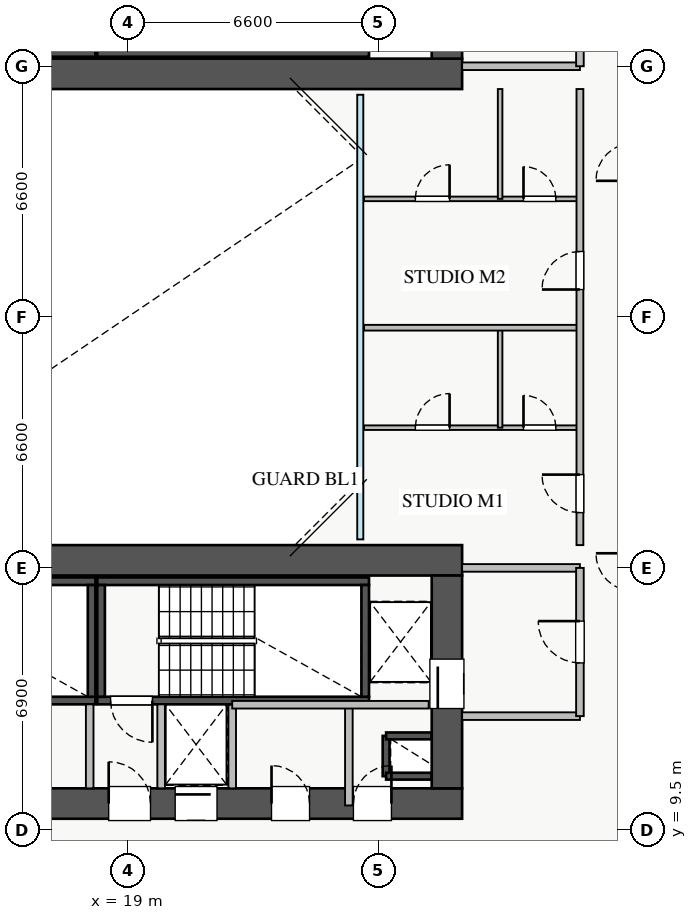
"""IFC4 building model, lengths in metres.
Left out: names, types, materials, properties, quantities, classifications, styles, units other than length and angle.
Written with IfcOpenShell. Run it as: python <this file> out.ifc"""

import sys

from ifc_helpers import new_model, si_unit, direction, frame, frame_2d, origin, place, context, subcontext, project, spatial, rectangle, extrude, source, transform, mapped, element, fill, save


model = new_model("IFC4")
c1 = context("Model", 3, precision=1e-05, world=origin(), true_north=direction((0.0, 1.0)))
c2 = subcontext(c1, "Body", "Model", "MODEL_VIEW")
j1 = project(units=[si_unit("LENGTHUNIT", "METRE"), si_unit("PLANEANGLEUNIT", "RADIAN")], contexts=[c1])
p1 = place(None, origin())
s1 = spatial("IfcSite", under=j1, at=p1, CompositionType="ELEMENT")
p2 = place(p1, origin())
s2 = spatial("IfcBuilding", under=s1, at=p2, CompositionType="ELEMENT")
p3 = place(p2, frame((0.0, 0.0, 29.5)))
s3 = spatial("IfcBuildingStorey", under=s2, at=p3, CompositionType="ELEMENT", Elevation=29.5)
p4 = place(p3, frame((25.8, 10.92, 0.0), z_axis=(0.0, 0.0, 1.0), x_axis=(0.0, 1.0, 0.0)))
e1 = element("IfcWall", 1, at=p4, inside=s3, PredefinedType="SHEAR", context=c2, shape_type="SweptSolid", body=[
    extrude(rectangle(XDim=1.06, YDim=0.18, at=frame_2d((0.53, 0.0))), origin(), (0.0, 0.0, 1.0), 3.07),
])
for number, where, z_axis, x_axis in (
    (2, (25.8, 11.98, 0.0), (0.0, 0.0, 1.0), (1.0, 0.0, 0.0)),
    (3, (25.8, 10.92, 0.0), (0.0, 0.0, 1.0), (1.0, 0.0, 0.0)),
):
    element("IfcWall", number, at=place(p3, frame(where, z_axis=z_axis, x_axis=x_axis)), inside=s3, PredefinedType="SHEAR", context=c2, shape_type="SweptSolid", body=[
        extrude(rectangle(XDim=1.2, YDim=0.18, at=frame_2d((0.6, 0.0))), origin(), (0.0, 0.0, 1.0), 3.07),
    ])
p5 = place(p3, frame((19.88, 12.8, 0.0), z_axis=(0.0, 0.0, 1.0), x_axis=(1.0, 0.0, 0.0)))
e4 = element("IfcWall", 4, at=p5, inside=s3, PredefinedType="SHEAR", context=c2, shape_type="SweptSolid", body=[
    extrude(rectangle(XDim=1.87, YDim=0.18, at=frame_2d((0.935, 0.0))), origin(), (0.0, 0.0, 1.0), 3.07),
])
p6 = place(p3, frame((11.0, 29.95, 0.0), z_axis=(0.0, 0.0, 1.0), x_axis=(1.0, 0.0, 0.0)))
e5 = element("IfcWall", 5, at=p6, inside=s3, PredefinedType="SHEAR", context=c2, shape_type="SweptSolid", body=[
    extrude(rectangle(XDim=7.15, YDim=0.2, at=frame_2d((3.575, 0.0))), origin(), (0.0, 0.0, 1.0), 3.25),
])
p7 = place(p3, frame((18.2, 29.95, 0.0), z_axis=(0.0, 0.0, 1.0), x_axis=(1.0, 0.0, 0.0)))
e6 = element("IfcWall", 6, at=p7, inside=s3, PredefinedType="SHEAR", context=c2, shape_type="SweptSolid", body=[
    extrude(rectangle(XDim=7.15, YDim=0.2, at=frame_2d((3.575, 0.0))), origin(), (0.0, 0.0, 1.0), 3.25),
])
p8 = place(p3, frame((11.0, 12.91, 0.0), z_axis=(0.0, 0.0, 1.0), x_axis=(1.0, 0.0, 0.0)))
e7 = element("IfcWall", 7, at=p8, inside=s3, PredefinedType="SHEAR", context=c2, shape_type="SweptSolid", body=[
    extrude(rectangle(XDim=7.15, YDim=0.2, at=frame_2d((3.575, 0.0))), origin(), (0.0, 0.0, 1.0), 3.25),
])
p9 = place(p8, frame((0.35, 0.0, 0.0)))
e8 = element("IfcOpeningElement", 8, at=p9, cuts=e7, PredefinedType="OPENING", context=c2, shape_type="SweptSolid", body=[
    extrude(rectangle(XDim=1.1, YDim=2.05, at=frame_2d((0.55, 1.025))), frame((0.0, 0.11, 0.0), z_axis=(0.0, -1.0, 0.0), x_axis=(1.0, 0.0, 0.0)), (0.0, 0.0, 1.0), 0.22),
])
p10 = place(p3, frame((11.0, 16.05, 0.0), z_axis=(0.0, 0.0, 1.0), x_axis=(1.0, 0.0, 0.0)))
e9 = element("IfcWall", 9, at=p10, inside=s3, PredefinedType="SHEAR", context=c2, shape_type="SweptSolid", body=[
    extrude(rectangle(XDim=7.15, YDim=0.2, at=frame_2d((3.575, 0.0))), origin(), (0.0, 0.0, 1.0), 3.25),
])
p11 = place(p3, frame((18.05, 13.01, 0.0), z_axis=(0.0, 0.0, 1.0), x_axis=(0.0, 1.0, 0.0)))
e10 = element("IfcWall", 10, at=p11, inside=s3, PredefinedType="SHEAR", context=c2, shape_type="SweptSolid", body=[
    extrude(rectangle(XDim=2.94, YDim=0.2, at=frame_2d((1.47, 0.0))), origin(), (0.0, 0.0, 1.0), 3.25),
])
p12 = place(p3, frame((18.2, 12.91, 0.0), z_axis=(0.0, 0.0, 1.0), x_axis=(1.0, 0.0, 0.0)))
e11 = element("IfcWall", 11, at=p12, inside=s3, PredefinedType="SHEAR", context=c2, shape_type="SweptSolid", body=[
    extrude(rectangle(XDim=7.15, YDim=0.2, at=frame_2d((3.575, 0.0))), origin(), (0.0, 0.0, 1.0), 3.25),
])
p13 = place(p12, frame((0.35, 0.0, 0.0)))
e12 = element("IfcOpeningElement", 12, at=p13, cuts=e11, PredefinedType="OPENING", context=c2, shape_type="SweptSolid", body=[
    extrude(rectangle(XDim=1.1, YDim=2.05, at=frame_2d((0.55, 1.025))), frame((0.0, 0.11, 0.0), z_axis=(0.0, -1.0, 0.0), x_axis=(1.0, 0.0, 0.0)), (0.0, 0.0, 1.0), 0.22),
])
p14 = place(p3, frame((18.2, 16.05, 0.0), z_axis=(0.0, 0.0, 1.0), x_axis=(1.0, 0.0, 0.0)))
e13 = element("IfcWall", 13, at=p14, inside=s3, PredefinedType="SHEAR", context=c2, shape_type="SweptSolid", body=[
    extrude(rectangle(XDim=7.15, YDim=0.2, at=frame_2d((3.575, 0.0))), origin(), (0.0, 0.0, 1.0), 3.25),
])
for number, where, z_axis, x_axis in (
    (14, (18.3, 13.01, 0.0), (0.0, 0.0, 1.0), (0.0, 1.0, 0.0)),
    (15, (25.25, 13.01, 0.0), (0.0, 0.0, 1.0), (0.0, 1.0, 0.0)),
):
    element("IfcWall", number, at=place(p3, frame(where, z_axis=z_axis, x_axis=x_axis)), inside=s3, PredefinedType="SHEAR", context=c2, shape_type="SweptSolid", body=[
        extrude(rectangle(XDim=2.94, YDim=0.2, at=frame_2d((1.47, 0.0))), origin(), (0.0, 0.0, 1.0), 3.25),
    ])
p15 = place(p3, frame((10.2, 29.4, 0.0), z_axis=(0.0, 0.0, 1.0), x_axis=(1.0, 0.0, 0.0)))
e16 = element("IfcWall", 16, at=p15, inside=s3, PredefinedType="SHEAR", context=c2, shape_type="SweptSolid", body=[
    extrude(rectangle(XDim=17.6, YDim=0.8, at=frame_2d((8.8, 0.0))), origin(), (0.0, 0.0, 1.0), 3.25),
])
p16 = place(p3, frame((27.4, 29.8, 0.0), z_axis=(0.0, 0.0, 1.0), x_axis=(0.0, 1.0, 0.0)))
e17 = element("IfcWall", 17, at=p16, inside=s3, PredefinedType="SHEAR", context=c2, shape_type="SweptSolid", body=[
    extrude(rectangle(XDim=5.6, YDim=0.8, at=frame_2d((2.8, 0.0))), origin(), (0.0, 0.0, 1.0), 3.25),
])
p17 = place(p16, frame((1.1, 0.0, 0.0)))
e18 = element("IfcOpeningElement", 18, at=p17, cuts=e17, PredefinedType="OPENING", context=c2, shape_type="SweptSolid", body=[
    extrude(rectangle(XDim=1.3, YDim=2.05, at=frame_2d((0.65, 1.025))), frame((0.0, 0.41, 0.0), z_axis=(0.0, -1.0, 0.0), x_axis=(1.0, 0.0, 0.0)), (0.0, 0.0, 1.0), 0.82),
])
p18 = place(p3, frame((10.2, 10.2, 0.0), z_axis=(0.0, 0.0, 1.0), x_axis=(1.0, 0.0, 0.0)))
e19 = element("IfcWall", 19, at=p18, inside=s3, PredefinedType="SHEAR", context=c2, shape_type="SweptSolid", body=[
    extrude(rectangle(XDim=17.6, YDim=0.8, at=frame_2d((8.8, 0.0))), origin(), (0.0, 0.0, 1.0), 3.25),
])
p19 = place(p18, frame((1.15, 0.0, 0.0)))
e20 = element("IfcOpeningElement", 20, at=p19, cuts=e19, PredefinedType="OPENING", context=c2, shape_type="SweptSolid", body=[
    extrude(rectangle(XDim=1.1, YDim=2.05, at=frame_2d((0.55, 1.025))), frame((0.0, 0.41, 0.0), z_axis=(0.0, -1.0, 0.0), x_axis=(1.0, 0.0, 0.0)), (0.0, 0.0, 1.0), 0.82),
])
p20 = place(p18, frame((8.3, 0.0, 0.0)))
e21 = element("IfcOpeningElement", 21, at=p20, cuts=e19, PredefinedType="OPENING", context=c2, shape_type="SweptSolid", body=[
    extrude(rectangle(XDim=1.1, YDim=2.05, at=frame_2d((0.55, 1.025))), frame((0.0, 0.41, 0.0), z_axis=(0.0, -1.0, 0.0), x_axis=(1.0, 0.0, 0.0)), (0.0, 0.0, 1.0), 0.82),
])
p21 = place(p18, frame((10.05, 0.0, 0.0)))
e22 = element("IfcOpeningElement", 22, at=p21, cuts=e19, PredefinedType="OPENING", context=c2, shape_type="SweptSolid", body=[
    extrude(rectangle(XDim=1.1, YDim=2.05, at=frame_2d((0.55, 1.025))), frame((0.0, 0.41, 0.0), z_axis=(0.0, -1.0, 0.0), x_axis=(1.0, 0.0, 0.0)), (0.0, 0.0, 1.0), 0.82),
])
p22 = place(p18, frame((14.74, 0.0, 0.0)))
e23 = element("IfcOpeningElement", 23, at=p22, cuts=e19, PredefinedType="OPENING", context=c2, shape_type="SweptSolid", body=[
    extrude(rectangle(XDim=1.0, YDim=2.05, at=frame_2d((0.5, 1.025))), frame((0.0, 0.41, 0.0), z_axis=(0.0, -1.0, 0.0), x_axis=(1.0, 0.0, 0.0)), (0.0, 0.0, 1.0), 0.82),
])
p23 = place(p18, frame((12.585, 0.0, 0.0)))
e24 = element("IfcOpeningElement", 24, at=p23, cuts=e19, PredefinedType="OPENING", context=c2, shape_type="SweptSolid", body=[
    extrude(rectangle(XDim=1.0, YDim=2.05, at=frame_2d((0.5, 1.025))), frame((0.0, 0.41, 0.0), z_axis=(0.0, -1.0, 0.0), x_axis=(1.0, 0.0, 0.0)), (0.0, 0.0, 1.0), 0.82),
])
p24 = place(p3, frame((10.2, 16.6, 0.0), z_axis=(0.0, 0.0, 1.0), x_axis=(1.0, 0.0, 0.0)))
e25 = element("IfcWall", 25, at=p24, inside=s3, PredefinedType="SHEAR", context=c2, shape_type="SweptSolid", body=[
    extrude(rectangle(XDim=17.6, YDim=0.8, at=frame_2d((8.8, 0.0))), origin(), (0.0, 0.0, 1.0), 3.25),
])
p25 = place(p3, frame((27.4, 10.6, 0.0), z_axis=(0.0, 0.0, 1.0), x_axis=(0.0, 1.0, 0.0)))
e26 = element("IfcWall", 26, at=p25, inside=s3, PredefinedType="SHEAR", context=c2, shape_type="SweptSolid", body=[
    extrude(rectangle(XDim=5.6, YDim=0.8, at=frame_2d((2.8, 0.0))), origin(), (0.0, 0.0, 1.0), 3.25),
])
p26 = place(p25, frame((2.1, 0.0, 0.0)))
e27 = element("IfcOpeningElement", 27, at=p26, cuts=e26, PredefinedType="OPENING", context=c2, shape_type="SweptSolid", body=[
    extrude(rectangle(XDim=1.3, YDim=2.05, at=frame_2d((0.65, 1.025))), frame((0.0, 0.41, 0.0), z_axis=(0.0, -1.0, 0.0), x_axis=(1.0, 0.0, 0.0)), (0.0, 0.0, 1.0), 0.82),
])
p27 = place(p3, frame((27.8, 29.6, 0.0), z_axis=(0.0, 0.0, 1.0), x_axis=(1.0, 0.0, 0.0)))
e28 = element("IfcWall", 28, at=p27, inside=s3, PredefinedType="PARTITIONING", context=c2, shape_type="SweptSolid", body=[
    extrude(rectangle(XDim=3.1, YDim=0.2, at=frame_2d((1.55, 0.0))), origin(), (0.0, 0.0, 1.0), 3.07),
])
p28 = place(p3, frame((30.9, 29.6, 0.0), z_axis=(0.0, 0.0, 1.0), x_axis=(0.0, 1.0, 0.0)))
e29 = element("IfcWall", 29, at=p28, inside=s3, PredefinedType="PARTITIONING", context=c2, shape_type="SweptSolid", body=[
    extrude(rectangle(XDim=3.9, YDim=0.2, at=frame_2d((1.95, 0.0))), origin(), (0.0, 0.0, 1.0), 3.07),
])
p29 = place(p28, frame((1.4, 0.0, 0.0)))
e30 = element("IfcOpeningElement", 30, at=p29, cuts=e29, PredefinedType="OPENING", context=c2, shape_type="SweptSolid", body=[
    extrude(rectangle(XDim=1.1, YDim=2.05, at=frame_2d((0.55, 1.025))), frame((0.0, 0.11, 0.0), z_axis=(0.0, -1.0, 0.0), x_axis=(1.0, 0.0, 0.0)), (0.0, 0.0, 1.0), 0.22),
])
for number, where, z_axis, x_axis in (
    (31, (27.8, 16.4, 0.0), (0.0, 0.0, 1.0), (1.0, 0.0, 0.0)),
    (32, (27.8, 12.5, 0.0), (0.0, 0.0, 1.0), (1.0, 0.0, 0.0)),
):
    element("IfcWall", number, at=place(p3, frame(where, z_axis=z_axis, x_axis=x_axis)), inside=s3, PredefinedType="PARTITIONING", context=c2, shape_type="SweptSolid", body=[
        extrude(rectangle(XDim=3.1, YDim=0.2, at=frame_2d((1.55, 0.0))), origin(), (0.0, 0.0, 1.0), 3.07),
    ])
p30 = place(p3, frame((30.9, 12.5, 0.0), z_axis=(0.0, 0.0, 1.0), x_axis=(0.0, 1.0, 0.0)))
e33 = element("IfcWall", 33, at=p30, inside=s3, PredefinedType="PARTITIONING", context=c2, shape_type="SweptSolid", body=[
    extrude(rectangle(XDim=3.9, YDim=0.2, at=frame_2d((1.95, 0.0))), origin(), (0.0, 0.0, 1.0), 3.07),
])
p31 = place(p30, frame((1.4, 0.0, 0.0)))
e34 = element("IfcOpeningElement", 34, at=p31, cuts=e33, PredefinedType="OPENING", context=c2, shape_type="SweptSolid", body=[
    extrude(rectangle(XDim=1.1, YDim=2.05, at=frame_2d((0.55, 1.025))), frame((0.0, 0.11, 0.0), z_axis=(0.0, -1.0, 0.0), x_axis=(1.0, 0.0, 0.0)), (0.0, 0.0, 1.0), 0.22),
])
for number, where, z_axis, x_axis in (
    (35, (18.0, 10.6, 0.0), (0.0, 0.0, 1.0), (0.0, 1.0, 0.0)),
    (36, (19.88, 10.6, 0.0), (0.0, 0.0, 1.0), (0.0, 1.0, 0.0)),
):
    element("IfcWall", number, at=place(p3, frame(where, z_axis=z_axis, x_axis=x_axis)), inside=s3, PredefinedType="PARTITIONING", context=c2, shape_type="SweptSolid", body=[
        extrude(rectangle(XDim=2.21, YDim=0.2, at=frame_2d((1.105, 0.0))), origin(), (0.0, 0.0, 1.0), 3.07),
    ])
p32 = place(p3, frame((24.82, 10.15, 0.0), z_axis=(0.0, 0.0, 1.0), x_axis=(0.0, 1.0, 0.0)))
e37 = element("IfcWall", 37, at=p32, inside=s3, PredefinedType="PARTITIONING", context=c2, shape_type="SweptSolid", body=[
    extrude(rectangle(XDim=2.65, YDim=0.2, at=frame_2d((1.325, 0.0))), origin(), (0.0, 0.0, 1.0), 3.07),
])
p33 = place(p3, frame((21.75, 10.6, 0.0), z_axis=(0.0, 0.0, 1.0), x_axis=(0.0, 1.0, 0.0)))
e38 = element("IfcWall", 38, at=p33, inside=s3, PredefinedType="PARTITIONING", context=c2, shape_type="SweptSolid", body=[
    extrude(rectangle(XDim=2.2, YDim=0.2, at=frame_2d((1.1, 0.0))), origin(), (0.0, 0.0, 1.0), 3.07),
])
p34 = place(p3, frame((21.75, 12.8, 0.0), z_axis=(0.0, 0.0, 1.0), x_axis=(1.0, 0.0, 0.0)))
e39 = element("IfcWall", 39, at=p34, inside=s3, PredefinedType="PARTITIONING", context=c2, shape_type="SweptSolid", body=[
    extrude(rectangle(XDim=5.17, YDim=0.2, at=frame_2d((2.585, 0.0))), origin(), (0.0, 0.0, 1.0), 3.07),
])
p35 = place(p3, frame((25.22, 20.09, 0.0), z_axis=(0.0, 0.0, 1.0), x_axis=(1.0, 0.0, 0.0)))
e40 = element("IfcWall", 40, at=p35, inside=s3, PredefinedType="PLUMBINGWALL", context=c2, shape_type="SweptSolid", body=[
    extrude(rectangle(XDim=5.68, YDim=0.12, at=frame_2d((2.84, 0.0))), origin(), (0.0, 0.0, 1.0), 2.625),
])
p36 = place(p35, frame((1.35, 0.0, 0.0)))
e41 = element("IfcOpeningElement", 41, at=p36, cuts=e40, PredefinedType="OPENING", context=c2, shape_type="SweptSolid", body=[
    extrude(rectangle(XDim=0.9, YDim=2.05, at=frame_2d((0.45, 1.025))), frame((0.0, 0.07, 0.0), z_axis=(0.0, -1.0, 0.0), x_axis=(1.0, 0.0, 0.0)), (0.0, 0.0, 1.0), 0.14),
])
p37 = place(p35, frame((4.195, 0.0, 0.0)))
e42 = element("IfcOpeningElement", 42, at=p37, cuts=e40, PredefinedType="OPENING", context=c2, shape_type="SweptSolid", body=[
    extrude(rectangle(XDim=0.85, YDim=2.05, at=frame_2d((0.425, 1.025))), frame((0.0, 0.07, 0.0), z_axis=(0.0, -1.0, 0.0), x_axis=(1.0, 0.0, 0.0)), (0.0, 0.0, 1.0), 0.14),
])
p38 = place(p3, frame((28.8, 20.09, 0.0), z_axis=(0.0, 0.0, 1.0), x_axis=(0.0, 1.0, 0.0)))
e43 = element("IfcWall", 43, at=p38, inside=s3, PredefinedType="PLUMBINGWALL", context=c2, shape_type="SweptSolid", body=[
    extrude(rectangle(XDim=2.63, YDim=0.12, at=frame_2d((1.315, 0.0))), origin(), (0.0, 0.0, 1.0), 3.07),
])
p39 = place(p3, frame((25.22, 26.11, 0.0), z_axis=(0.0, 0.0, 1.0), x_axis=(1.0, 0.0, 0.0)))
e44 = element("IfcWall", 44, at=p39, inside=s3, PredefinedType="PLUMBINGWALL", context=c2, shape_type="SweptSolid", body=[
    extrude(rectangle(XDim=5.68, YDim=0.12, at=frame_2d((2.84, 0.0))), origin(), (0.0, 0.0, 1.0), 2.625),
])
p40 = place(p39, frame((1.35, 0.0, 0.0)))
e45 = element("IfcOpeningElement", 45, at=p40, cuts=e44, PredefinedType="OPENING", context=c2, shape_type="SweptSolid", body=[
    extrude(rectangle(XDim=0.9, YDim=2.05, at=frame_2d((0.45, 1.025))), frame((0.0, 0.07, 0.0), z_axis=(0.0, -1.0, 0.0), x_axis=(1.0, 0.0, 0.0)), (0.0, 0.0, 1.0), 0.14),
])
p41 = place(p39, frame((4.195, 0.0, 0.0)))
e46 = element("IfcOpeningElement", 46, at=p41, cuts=e44, PredefinedType="OPENING", context=c2, shape_type="SweptSolid", body=[
    extrude(rectangle(XDim=0.85, YDim=2.05, at=frame_2d((0.425, 1.025))), frame((0.0, 0.07, 0.0), z_axis=(0.0, -1.0, 0.0), x_axis=(1.0, 0.0, 0.0)), (0.0, 0.0, 1.0), 0.14),
])
p42 = place(p3, frame((28.8, 26.11, 0.0), z_axis=(0.0, 0.0, 1.0), x_axis=(0.0, 1.0, 0.0)))
e47 = element("IfcWall", 47, at=p42, inside=s3, PredefinedType="PLUMBINGWALL", context=c2, shape_type="SweptSolid", body=[
    extrude(rectangle(XDim=2.89, YDim=0.12, at=frame_2d((1.445, 0.0))), origin(), (0.0, 0.0, 1.0), 3.07),
])
p43 = place(p3, frame((25.22, 22.72, 0.0), z_axis=(0.0, 0.0, 1.0), x_axis=(1.0, 0.0, 0.0)))
e48 = element("IfcWall", 48, at=p43, inside=s3, PredefinedType="PARTITIONING", context=c2, shape_type="SweptSolid", body=[
    extrude(rectangle(XDim=5.68, YDim=0.15, at=frame_2d((2.84, 0.0))), origin(), (0.0, 0.0, 1.0), 3.07),
])
p44 = place(p3, frame((30.9, 17.0, 0.0), z_axis=(0.0, 0.0, 1.0), x_axis=(0.0, 1.0, 0.0)))
e49 = element("IfcWall", 49, at=p44, inside=s3, PredefinedType="PARTITIONING", context=c2, shape_type="SweptSolid", body=[
    extrude(rectangle(XDim=12.0, YDim=0.18, at=frame_2d((6.0, 0.0))), origin(), (0.0, 0.0, 1.0), 3.07),
])
p45 = place(p44, frame((0.855, 0.0, 0.0)))
e50 = element("IfcOpeningElement", 50, at=p45, cuts=e49, PredefinedType="OPENING", context=c2, shape_type="SweptSolid", body=[
    extrude(rectangle(XDim=1.0, YDim=2.05, at=frame_2d((0.5, 1.025))), frame((0.0, 0.1, 0.0), z_axis=(0.0, -1.0, 0.0), x_axis=(1.0, 0.0, 0.0)), (0.0, 0.0, 1.0), 0.2),
])
p46 = place(p44, frame((6.725, 0.0, 0.0)))
e51 = element("IfcOpeningElement", 51, at=p46, cuts=e49, PredefinedType="OPENING", context=c2, shape_type="SweptSolid", body=[
    extrude(rectangle(XDim=1.0, YDim=2.05, at=frame_2d((0.5, 1.025))), frame((0.0, 0.1, 0.0), z_axis=(0.0, -1.0, 0.0), x_axis=(1.0, 0.0, 0.0)), (0.0, 0.0, 1.0), 0.2),
])
m1 = source(origin(), c2, "Body", "SweptSolid", [
    extrude(rectangle(XDim=1.3, YDim=2.05, at=frame_2d((0.65, 1.025))), frame((0.0, 0.025, 0.0), z_axis=(0.0, -1.0, 0.0), x_axis=(1.0, 0.0, 0.0)), (0.0, 0.0, 1.0), 0.05),
])
p47 = place(p26, origin())
e52 = element("IfcDoor", 52, at=p47, inside=s3, OperationType="SLIDING_TO_RIGHT", PredefinedType="DOOR", context=c2, shape_type="MappedRepresentation", body=[
    mapped(m1, transform((0.0, 0.0, 0.0), x_axis=(1.0, 0.0, 0.0), y_axis=(0.0, 1.0, 0.0), z_axis=(0.0, 0.0, 1.0), scale=1.0)),
])
fill(e27, e52)
m2 = source(origin(), c2, "Body", "SweptSolid", [
    extrude(rectangle(XDim=1.1, YDim=2.05, at=frame_2d((0.55, 1.025))), frame((0.0, 0.025, 0.0), z_axis=(0.0, -1.0, 0.0), x_axis=(1.0, 0.0, 0.0)), (0.0, 0.0, 1.0), 0.05),
])
p48 = place(p20, origin())
e53 = element("IfcDoor", 53, at=p48, inside=s3, OperationType="SINGLE_SWING_LEFT", PredefinedType="DOOR", context=c2, shape_type="MappedRepresentation", body=[
    mapped(m2, transform((0.0, 0.0, 0.0), x_axis=(1.0, 0.0, 0.0), y_axis=(0.0, 1.0, 0.0), z_axis=(0.0, 0.0, 1.0), scale=1.0)),
])
fill(e21, e53)
p49 = place(p13, frame((1.1, 0.0, 0.0), z_axis=(0.0, 0.0, 1.0), x_axis=(-1.0, 0.0, 0.0)))
e54 = element("IfcDoor", 54, at=p49, inside=s3, OperationType="SINGLE_SWING_RIGHT", PredefinedType="DOOR", context=c2, shape_type="MappedRepresentation", body=[
    mapped(m2, transform((0.0, 0.0, 0.0), x_axis=(1.0, 0.0, 0.0), y_axis=(0.0, 1.0, 0.0), z_axis=(0.0, 0.0, 1.0), scale=1.0)),
])
fill(e12, e54)
p50 = place(p21, origin())
e55 = element("IfcDoor", 55, at=p50, inside=s3, OperationType="SLIDING_TO_RIGHT", PredefinedType="DOOR", context=c2, shape_type="MappedRepresentation", body=[
    mapped(m2, transform((0.0, 0.0, 0.0), x_axis=(1.0, 0.0, 0.0), y_axis=(0.0, 1.0, 0.0), z_axis=(0.0, 0.0, 1.0), scale=1.0)),
])
fill(e22, e55)
m3 = source(origin(), c2, "Body", "SweptSolid", [
    extrude(rectangle(XDim=1.0, YDim=2.05, at=frame_2d((0.5, 1.025))), frame((0.0, 0.025, 0.0), z_axis=(0.0, -1.0, 0.0), x_axis=(1.0, 0.0, 0.0)), (0.0, 0.0, 1.0), 0.05),
])
p51 = place(p22, origin())
e56 = element("IfcDoor", 56, at=p51, inside=s3, OperationType="SINGLE_SWING_RIGHT", PredefinedType="DOOR", context=c2, shape_type="MappedRepresentation", body=[
    mapped(m3, transform((0.0, 0.0, 0.0), x_axis=(1.0, 0.0, 0.0), y_axis=(0.0, 1.0, 0.0), z_axis=(0.0, 0.0, 1.0), scale=1.0)),
])
fill(e23, e56)
p52 = place(p23, origin())
e57 = element("IfcDoor", 57, at=p52, inside=s3, OperationType="SINGLE_SWING_LEFT", PredefinedType="DOOR", context=c2, shape_type="MappedRepresentation", body=[
    mapped(m3, transform((0.0, 0.0, 0.0), x_axis=(1.0, 0.0, 0.0), y_axis=(0.0, 1.0, 0.0), z_axis=(0.0, 0.0, 1.0), scale=1.0)),
])
fill(e24, e57)
p53 = place(p31, origin())
e58 = element("IfcDoor", 58, at=p53, inside=s3, OperationType="SINGLE_SWING_RIGHT", PredefinedType="DOOR", context=c2, shape_type="MappedRepresentation", body=[
    mapped(m2, transform((0.0, 0.0, 0.0), x_axis=(1.0, 0.0, 0.0), y_axis=(0.0, 1.0, 0.0), z_axis=(0.0, 0.0, 1.0), scale=1.0)),
])
fill(e34, e58)
m4 = source(origin(), c2, "Body", "SweptSolid", [
    extrude(rectangle(XDim=0.9, YDim=2.05, at=frame_2d((0.45, 1.025))), frame((0.0, 0.025, 0.0), z_axis=(0.0, -1.0, 0.0), x_axis=(1.0, 0.0, 0.0)), (0.0, 0.0, 1.0), 0.05),
])
p54 = place(p36, origin())
e59 = element("IfcDoor", 59, at=p54, inside=s3, OperationType="SINGLE_SWING_RIGHT", PredefinedType="DOOR", context=c2, shape_type="MappedRepresentation", body=[
    mapped(m4, transform((0.0, 0.0, 0.0), x_axis=(1.0, 0.0, 0.0), y_axis=(0.0, 1.0, 0.0), z_axis=(0.0, 0.0, 1.0), scale=1.0)),
])
fill(e41, e59)
m5 = source(origin(), c2, "Body", "SweptSolid", [
    extrude(rectangle(XDim=0.85, YDim=2.05, at=frame_2d((0.425, 1.025))), frame((0.0, 0.025, 0.0), z_axis=(0.0, -1.0, 0.0), x_axis=(1.0, 0.0, 0.0)), (0.0, 0.0, 1.0), 0.05),
])
p55 = place(p37, origin())
e60 = element("IfcDoor", 60, at=p55, inside=s3, OperationType="SINGLE_SWING_LEFT", PredefinedType="DOOR", context=c2, shape_type="MappedRepresentation", body=[
    mapped(m5, transform((0.0, 0.0, 0.0), x_axis=(1.0, 0.0, 0.0), y_axis=(0.0, 1.0, 0.0), z_axis=(0.0, 0.0, 1.0), scale=1.0)),
])
fill(e42, e60)
p56 = place(p40, origin())
e61 = element("IfcDoor", 61, at=p56, inside=s3, OperationType="SINGLE_SWING_RIGHT", PredefinedType="DOOR", context=c2, shape_type="MappedRepresentation", body=[
    mapped(m4, transform((0.0, 0.0, 0.0), x_axis=(1.0, 0.0, 0.0), y_axis=(0.0, 1.0, 0.0), z_axis=(0.0, 0.0, 1.0), scale=1.0)),
])
fill(e45, e61)
p57 = place(p41, origin())
e62 = element("IfcDoor", 62, at=p57, inside=s3, OperationType="SINGLE_SWING_LEFT", PredefinedType="DOOR", context=c2, shape_type="MappedRepresentation", body=[
    mapped(m5, transform((0.0, 0.0, 0.0), x_axis=(1.0, 0.0, 0.0), y_axis=(0.0, 1.0, 0.0), z_axis=(0.0, 0.0, 1.0), scale=1.0)),
])
fill(e46, e62)
p58 = place(p45, origin())
e63 = element("IfcDoor", 63, at=p58, inside=s3, OperationType="SINGLE_SWING_RIGHT", PredefinedType="DOOR", context=c2, shape_type="MappedRepresentation", body=[
    mapped(m3, transform((0.0, 0.0, 0.0), x_axis=(1.0, 0.0, 0.0), y_axis=(0.0, 1.0, 0.0), z_axis=(0.0, 0.0, 1.0), scale=1.0)),
])
fill(e50, e63)
p59 = place(p46, origin())
e64 = element("IfcDoor", 64, at=p59, inside=s3, OperationType="SINGLE_SWING_LEFT", PredefinedType="DOOR", context=c2, shape_type="MappedRepresentation", body=[
    mapped(m3, transform((0.0, 0.0, 0.0), x_axis=(1.0, 0.0, 0.0), y_axis=(0.0, 1.0, 0.0), z_axis=(0.0, 0.0, 1.0), scale=1.0)),
])
fill(e51, e64)
save(model, sys.argv[1])
